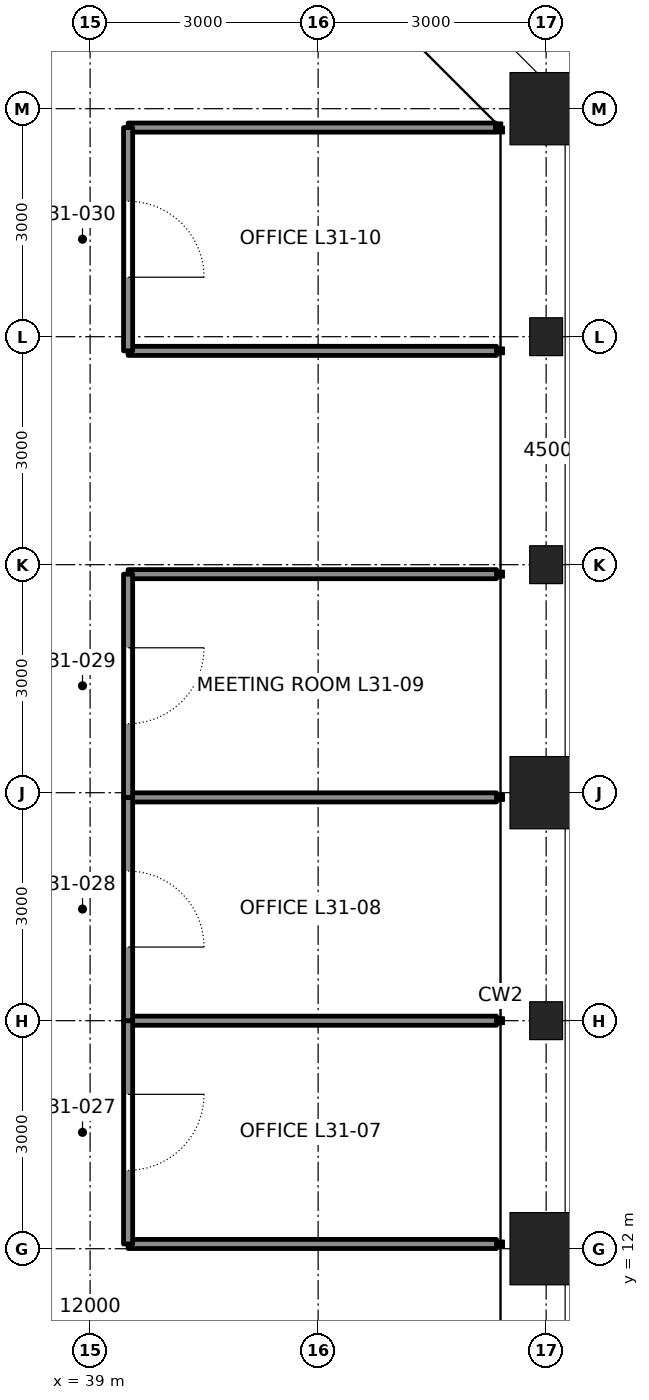
"""IFC4 building model, lengths in metres.
Left out: names, types, materials, properties, quantities, classifications, styles, units other than length and angle.
Written with IfcOpenShell. Run it as: python <this file> out.ifc"""

import sys

from ifc_helpers import new_model, si_unit, direction, frame, frame_2d, origin, origin_2d, place, context, subcontext, project, spatial, rectangle, hollow_rectangle, i_section, extrude, element, fill, save


model = new_model("IFC4")
c1 = context("Model", 3, precision=1e-05, world=origin(), true_north=direction((0.0, 1.0)))
c2 = subcontext(c1, "Body", "Model", "MODEL_VIEW")
j1 = project(units=[si_unit("LENGTHUNIT", "METRE"), si_unit("PLANEANGLEUNIT", "RADIAN")], contexts=[c1])
p1 = place(None, origin())
s1 = spatial("IfcSite", under=j1, at=p1, CompositionType="ELEMENT")
p2 = place(p1, origin())
s2 = spatial("IfcBuilding", under=s1, at=p2, CompositionType="ELEMENT")
p3 = place(p2, frame((0.0, 0.0, 144.6)))
s3 = spatial("IfcBuildingStorey", under=s2, at=p3, CompositionType="ELEMENT", Elevation=144.6)
p4 = place(p3, frame((45.0, 12.0, 0.0), z_axis=(0.0, 0.0, 1.0), x_axis=(1.0, 0.0, 0.0)))
e1 = element("IfcColumn", 1, at=p4, inside=s3, PredefinedType="COLUMN", context=c2, shape_type="SweptSolid", body=[
    extrude(hollow_rectangle(XDim=0.95, YDim=0.95, WallThickness=0.11, at=origin_2d()), origin(), (0.0, 0.0, 1.0), 4.2),
])
p5 = place(p3, frame((45.0, 15.0, 0.0), z_axis=(0.0, 0.0, 1.0), x_axis=(1.0, 0.0, 0.0)))
e2 = element("IfcColumn", 2, at=p5, inside=s3, PredefinedType="COLUMN", context=c2, shape_type="SweptSolid", body=[
    extrude(i_section(OverallWidth=0.432, OverallDepth=0.498, WebThickness=0.056, FlangeThickness=0.089, at=origin_2d()), origin(), (0.0, 0.0, 1.0), 4.2),
])
p6 = place(p3, frame((45.0, 18.0, 0.0), z_axis=(0.0, 0.0, 1.0), x_axis=(1.0, 0.0, 0.0)))
e3 = element("IfcColumn", 3, at=p6, inside=s3, PredefinedType="COLUMN", context=c2, shape_type="SweptSolid", body=[
    extrude(hollow_rectangle(XDim=0.95, YDim=0.95, WallThickness=0.11, at=origin_2d()), origin(), (0.0, 0.0, 1.0), 4.2),
])
for number, where, z_axis, x_axis in (
    (4, (45.0, 21.0, 0.0), (0.0, 0.0, 1.0), (1.0, 0.0, 0.0)),
    (5, (45.0, 24.0, 0.0), (0.0, 0.0, 1.0), (1.0, 0.0, 0.0)),
):
    element("IfcColumn", number, at=place(p3, frame(where, z_axis=z_axis, x_axis=x_axis)), inside=s3, PredefinedType="COLUMN", context=c2, shape_type="SweptSolid", body=[
        extrude(i_section(OverallWidth=0.432, OverallDepth=0.498, WebThickness=0.056, FlangeThickness=0.089, at=origin_2d()), origin(), (0.0, 0.0, 1.0), 4.2),
    ])
p7 = place(p3, frame((45.0, 27.0, 0.0), z_axis=(0.0, 0.0, 1.0), x_axis=(1.0, 0.0, 0.0)))
e6 = element("IfcColumn", 6, at=p7, inside=s3, PredefinedType="COLUMN", context=c2, shape_type="SweptSolid", body=[
    extrude(hollow_rectangle(XDim=0.95, YDim=0.95, WallThickness=0.095, at=origin_2d()), origin(), (0.0, 0.0, 1.0), 4.2),
])
p8 = place(p3, frame((44.347, 12.062, 0.0), z_axis=(0.0, 0.0, 1.0), x_axis=(-1.0, 0.0, 0.0)))
e7 = element("IfcWall", 7, at=p8, inside=s3, PredefinedType="PARTITIONING", context=c2, shape_type="SweptSolid", body=[
    extrude(rectangle(XDim=4.847, YDim=0.12, at=frame_2d((2.424, 0.0))), origin(), (0.0, 0.0, 1.0), 3.27),
])
for number, where, z_axis, x_axis in (
    (8, (44.347, 15.0, 0.0), (0.0, 0.0, 1.0), (-1.0, 0.0, 0.0)),
    (9, (44.347, 17.938, 0.0), (0.0, 0.0, 1.0), (-1.0, 0.0, 0.0)),
    (10, (44.347, 20.876, 0.0), (0.0, 0.0, 1.0), (-1.0, 0.0, 0.0)),
):
    element("IfcWall", number, at=place(p3, frame(where, z_axis=z_axis, x_axis=x_axis)), inside=s3, PredefinedType="PARTITIONING", context=c2, shape_type="SweptSolid", body=[
        extrude(rectangle(XDim=4.847, YDim=0.12, at=frame_2d((2.424, 0.0))), origin(), (0.0, 0.0, 1.0), 3.357),
    ])
p9 = place(p3, frame((44.347, 23.814, 0.0), z_axis=(0.0, 0.0, 1.0), x_axis=(-1.0, 0.0, 0.0)))
e11 = element("IfcWall", 11, at=p9, inside=s3, PredefinedType="PARTITIONING", context=c2, shape_type="SweptSolid", body=[
    extrude(rectangle(XDim=4.847, YDim=0.12, at=frame_2d((2.424, 0.0))), origin(), (0.0, 0.0, 1.0), 4.04),
])
p10 = place(p3, frame((44.334, 26.751, 0.0), z_axis=(0.0, 0.0, 1.0), x_axis=(-1.0, 0.0, 0.0)))
e12 = element("IfcWall", 12, at=p10, inside=s3, PredefinedType="PARTITIONING", context=c2, shape_type="SweptSolid", body=[
    extrude(rectangle(XDim=4.834, YDim=0.12, at=frame_2d((2.417, 0.0))), origin(), (0.0, 0.0, 1.0), 4.04),
])
p11 = place(p3, frame((39.5, 12.062, 0.0), z_axis=(0.0, 0.0, 1.0), x_axis=(0.0, 1.0, 0.0)))
e13 = element("IfcWall", 13, at=p11, inside=s3, PredefinedType="PARTITIONING", context=c2, shape_type="SweptSolid", body=[
    extrude(rectangle(XDim=2.938, YDim=0.12, at=frame_2d((1.469, 0.0))), origin(), (0.0, 0.0, 1.0), 4.04),
])
p12 = place(p11, frame((0.969, 0.0, 0.0)))
e14 = element("IfcOpeningElement", 14, at=p12, cuts=e13, PredefinedType="OPENING", context=c2, shape_type="SweptSolid", body=[
    extrude(rectangle(XDim=1.0, YDim=2.4, at=frame_2d((0.5, 1.2))), frame((0.0, 0.07, 0.0), z_axis=(0.0, -1.0, 0.0), x_axis=(1.0, 0.0, 0.0)), (0.0, 0.0, 1.0), 0.14),
])
p13 = place(p3, frame((39.5, 15.0, 0.0), z_axis=(0.0, 0.0, 1.0), x_axis=(0.0, 1.0, 0.0)))
e15 = element("IfcWall", 15, at=p13, inside=s3, PredefinedType="PARTITIONING", context=c2, shape_type="SweptSolid", body=[
    extrude(rectangle(XDim=2.938, YDim=0.12, at=frame_2d((1.469, 0.0))), origin(), (0.0, 0.0, 1.0), 4.04),
])
p14 = place(p13, frame((0.969, 0.0, 0.0)))
e16 = element("IfcOpeningElement", 16, at=p14, cuts=e15, PredefinedType="OPENING", context=c2, shape_type="SweptSolid", body=[
    extrude(rectangle(XDim=1.0, YDim=2.4, at=frame_2d((0.5, 1.2))), frame((0.0, 0.07, 0.0), z_axis=(0.0, -1.0, 0.0), x_axis=(1.0, 0.0, 0.0)), (0.0, 0.0, 1.0), 0.14),
])
p15 = place(p3, frame((39.5, 17.938, 0.0), z_axis=(0.0, 0.0, 1.0), x_axis=(0.0, 1.0, 0.0)))
e17 = element("IfcWall", 17, at=p15, inside=s3, PredefinedType="PARTITIONING", context=c2, shape_type="SweptSolid", body=[
    extrude(rectangle(XDim=2.938, YDim=0.12, at=frame_2d((1.469, 0.0))), origin(), (0.0, 0.0, 1.0), 4.04),
])
p16 = place(p15, frame((0.969, 0.0, 0.0)))
e18 = element("IfcOpeningElement", 18, at=p16, cuts=e17, PredefinedType="OPENING", context=c2, shape_type="SweptSolid", body=[
    extrude(rectangle(XDim=1.0, YDim=2.4, at=frame_2d((0.5, 1.2))), frame((0.0, 0.07, 0.0), z_axis=(0.0, -1.0, 0.0), x_axis=(1.0, 0.0, 0.0)), (0.0, 0.0, 1.0), 0.14),
])
p17 = place(p3, frame((39.5, 23.814, 0.0), z_axis=(0.0, 0.0, 1.0), x_axis=(0.0, 1.0, 0.0)))
e19 = element("IfcWall", 19, at=p17, inside=s3, PredefinedType="PARTITIONING", context=c2, shape_type="SweptSolid", body=[
    extrude(rectangle(XDim=2.938, YDim=0.12, at=frame_2d((1.469, 0.0))), origin(), (0.0, 0.0, 1.0), 4.04),
])
p18 = place(p17, frame((0.969, 0.0, 0.0)))
e20 = element("IfcOpeningElement", 20, at=p18, cuts=e19, PredefinedType="OPENING", context=c2, shape_type="SweptSolid", body=[
    extrude(rectangle(XDim=1.0, YDim=2.4, at=frame_2d((0.5, 1.2))), frame((0.0, 0.07, 0.0), z_axis=(0.0, -1.0, 0.0), x_axis=(1.0, 0.0, 0.0)), (0.0, 0.0, 1.0), 0.14),
])
p19 = place(p12, frame((1.0, 0.0, 0.0), z_axis=(0.0, 0.0, 1.0), x_axis=(-1.0, 0.0, 0.0)))
e21 = element("IfcDoor", 21, at=p19, inside=s3, OperationType="SINGLE_SWING_LEFT", PredefinedType="DOOR", context=c2, shape_type="SweptSolid", body=[
    extrude(rectangle(XDim=1.0, YDim=2.4, at=frame_2d((0.5, 1.2))), frame((0.0, 0.025, 0.0), z_axis=(0.0, -1.0, 0.0), x_axis=(1.0, 0.0, 0.0)), (0.0, 0.0, 1.0), 0.05),
])
fill(e14, e21)
p20 = place(p14, frame((1.0, 0.0, 0.0), z_axis=(0.0, 0.0, 1.0), x_axis=(-1.0, 0.0, 0.0)))
e22 = element("IfcDoor", 22, at=p20, inside=s3, OperationType="SINGLE_SWING_RIGHT", PredefinedType="DOOR", context=c2, shape_type="SweptSolid", body=[
    extrude(rectangle(XDim=1.0, YDim=2.4, at=frame_2d((0.5, 1.2))), frame((0.0, 0.025, 0.0), z_axis=(0.0, -1.0, 0.0), x_axis=(1.0, 0.0, 0.0)), (0.0, 0.0, 1.0), 0.05),
])
fill(e16, e22)
p21 = place(p16, frame((1.0, 0.0, 0.0), z_axis=(0.0, 0.0, 1.0), x_axis=(-1.0, 0.0, 0.0)))
e23 = element("IfcDoor", 23, at=p21, inside=s3, OperationType="SINGLE_SWING_LEFT", PredefinedType="DOOR", context=c2, shape_type="SweptSolid", body=[
    extrude(rectangle(XDim=1.0, YDim=2.4, at=frame_2d((0.5, 1.2))), frame((0.0, 0.025, 0.0), z_axis=(0.0, -1.0, 0.0), x_axis=(1.0, 0.0, 0.0)), (0.0, 0.0, 1.0), 0.05),
])
fill(e18, e23)
p22 = place(p18, frame((1.0, 0.0, 0.0), z_axis=(0.0, 0.0, 1.0), x_axis=(-1.0, 0.0, 0.0)))
e24 = element("IfcDoor", 24, at=p22, inside=s3, OperationType="SINGLE_SWING_RIGHT", PredefinedType="DOOR", context=c2, shape_type="SweptSolid", body=[
    extrude(rectangle(XDim=1.0, YDim=2.4, at=frame_2d((0.5, 1.2))), frame((0.0, 0.025, 0.0), z_axis=(0.0, -1.0, 0.0), x_axis=(1.0, 0.0, 0.0)), (0.0, 0.0, 1.0), 0.05),
])
fill(e20, e24)
save(model, sys.argv[1])
